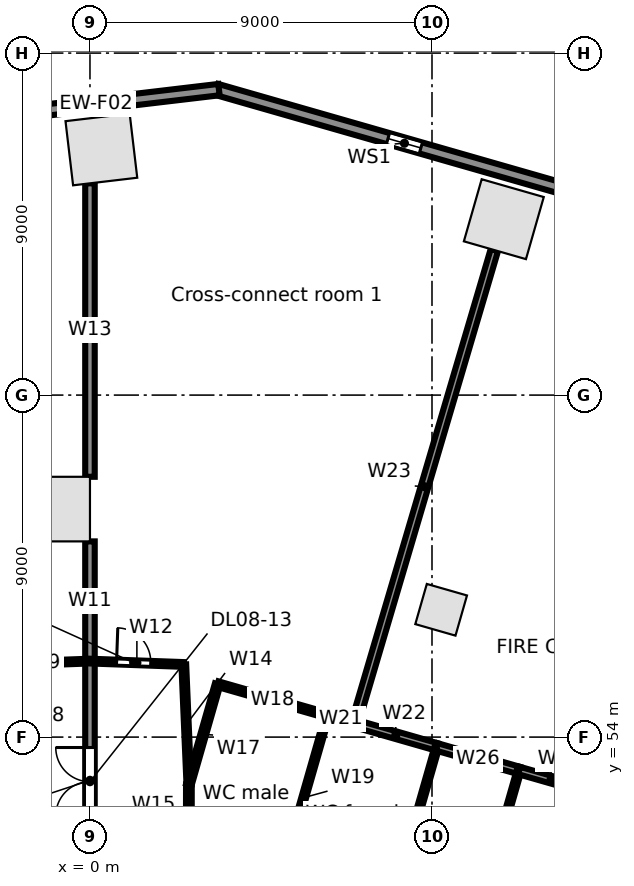
"""IFC4 building model, lengths in metres.
Left out: names, types, materials, properties, quantities, classifications, styles, units other than length and angle.
Written with IfcOpenShell. Run it as: python <this file> out.ifc"""

import sys

from ifc_helpers import new_model, si_unit, direction, frame, frame_2d, origin, origin_2d, place, context, subcontext, project, spatial, rectangle, extrude, element, fill, save


model = new_model("IFC4")
c1 = context("Model", 3, precision=1e-05, world=origin(), true_north=direction((0.0, 1.0)))
c2 = subcontext(c1, "Body", "Model", "MODEL_VIEW")
j1 = project(units=[si_unit("LENGTHUNIT", "METRE"), si_unit("PLANEANGLEUNIT", "RADIAN")], contexts=[c1])
p1 = place(None, origin())
s1 = spatial("IfcSite", under=j1, at=p1, CompositionType="ELEMENT")
p2 = place(p1, origin())
s2 = spatial("IfcBuilding", under=s1, at=p2, CompositionType="ELEMENT")
p3 = place(p2, frame((0.0, 0.0, 51.5)))
s3 = spatial("IfcBuildingStorey", under=s2, at=p3, CompositionType="ELEMENT", Elevation=51.5)
for number, where, z_axis, x_axis in (
    (1, (10.89, 67.629, 0.0), (0.0, 0.0, 1.0), (-0.961, 0.276, 0.0)),
    (2, (0.3, 69.464, 0.0), (0.0, 0.0, 1.0), (-0.993, -0.118, 0.0)),
    (3, (-0.85, 60.0, 0.0), (0.0, 0.0, 1.0), (0.0, 1.0, 0.0)),
):
    element("IfcColumn", number, at=place(p3, frame(where, z_axis=z_axis, x_axis=x_axis)), inside=s3, PredefinedType="COLUMN", context=c2, shape_type="SweptSolid", body=[
        extrude(rectangle(XDim=1.7, YDim=1.7, at=origin_2d()), origin(), (0.0, 0.0, 1.0), 5.0),
    ])
p4 = place(p3, frame((9.241, 57.35, 0.0), z_axis=(0.0, 0.0, 1.0), x_axis=(0.961261695938, -0.275637355817, 0.0)))
e4 = element("IfcColumn", 4, at=p4, inside=s3, PredefinedType="COLUMN", context=c2, shape_type="SweptSolid", body=[
    extrude(rectangle(XDim=1.1, YDim=1.1, at=origin_2d()), origin(), (0.0, 0.0, 1.0), 5.0),
])
p5 = place(p3, frame((3.335, 71.044, 0.0), z_axis=(0.0, 0.0, 1.0), x_axis=(0.961260130989, -0.275642813387, 0.0)))
e5 = element("IfcWall", 5, at=p5, inside=s3, PredefinedType="STANDARD", context=c2, shape_type="SweptSolid", body=[
    extrude(rectangle(XDim=32.741, YDim=0.3, at=frame_2d((16.371, 0.0))), origin(), (0.0, 0.0, 1.0), 4.68),
])
p6 = place(p5, frame((29.207, 0.0, 0.6)))
e6 = element("IfcOpeningElement", 6, at=p6, cuts=e5, PredefinedType="OPENING", context=c2, shape_type="SweptSolid", body=[
    extrude(rectangle(XDim=0.9, YDim=3.2, at=frame_2d((0.45, 1.6))), frame((0.0, 0.16, 0.0), z_axis=(0.0, -1.0, 0.0), x_axis=(1.0, 0.0, 0.0)), (0.0, 0.0, 1.0), 0.32),
])
p7 = place(p5, frame((21.034, 0.0, 0.6)))
e7 = element("IfcOpeningElement", 7, at=p7, cuts=e5, PredefinedType="OPENING", context=c2, shape_type="SweptSolid", body=[
    extrude(rectangle(XDim=0.9, YDim=3.2, at=frame_2d((0.45, 1.6))), frame((0.0, 0.16, 0.0), z_axis=(0.0, -1.0, 0.0), x_axis=(1.0, 0.0, 0.0)), (0.0, 0.0, 1.0), 0.32),
])
p8 = place(p5, frame((12.861, 0.0, 0.6)))
e8 = element("IfcOpeningElement", 8, at=p8, cuts=e5, PredefinedType="OPENING", context=c2, shape_type="SweptSolid", body=[
    extrude(rectangle(XDim=0.9, YDim=3.2, at=frame_2d((0.45, 1.6))), frame((0.0, 0.16, 0.0), z_axis=(0.0, -1.0, 0.0), x_axis=(1.0, 0.0, 0.0)), (0.0, 0.0, 1.0), 0.32),
])
p9 = place(p5, frame((4.688, 0.0, 0.6)))
e9 = element("IfcOpeningElement", 9, at=p9, cuts=e5, PredefinedType="OPENING", context=c2, shape_type="SweptSolid", body=[
    extrude(rectangle(XDim=0.9, YDim=3.2, at=frame_2d((0.45, 1.6))), frame((0.0, 0.16, 0.0), z_axis=(0.0, -1.0, 0.0), x_axis=(1.0, 0.0, 0.0)), (0.0, 0.0, 1.0), 0.32),
])
p10 = place(p3, frame((-3.076, 70.273, 0.0), z_axis=(0.0, 0.0, 1.0), x_axis=(0.993067743007, 0.117543429416, 0.0)))
e10 = element("IfcWall", 10, at=p10, inside=s3, PredefinedType="STANDARD", context=c2, shape_type="SweptSolid", body=[
    extrude(rectangle(XDim=6.516, YDim=0.3, at=frame_2d((3.258, 0.0))), origin(), (0.0, 0.0, 1.0), 4.68),
])
p11 = place(p3, frame((-2.67, 55.904, 0.0), z_axis=(0.0, 0.0, 1.0), x_axis=(0.999354913865, 0.03591317494, 0.0)))
e11 = element("IfcWall", 11, at=p11, inside=s3, PredefinedType="PARTITIONING", context=c2, shape_type="SweptSolid", body=[
    extrude(rectangle(XDim=2.672, YDim=0.125, at=frame_2d((1.336, 0.0))), origin(), (0.0, 0.0, 1.0), 3.742),
])
p12 = place(p3, frame((0.0, 49.726, 0.0), z_axis=(0.0, 0.0, 1.0), x_axis=(0.0, 1.0, 0.0)))
e12 = element("IfcWall", 12, at=p12, inside=s3, PredefinedType="PARTITIONING", context=c2, shape_type="SweptSolid", body=[
    extrude(rectangle(XDim=6.274, YDim=0.25, at=frame_2d((3.137, 0.0))), origin(), (0.0, 0.0, 1.0), 4.68),
])
p13 = place(p12, frame((2.2, 0.0, 0.0)))
e13 = element("IfcOpeningElement", 13, at=p13, cuts=e12, PredefinedType="OPENING", context=c2, shape_type="SweptSolid", body=[
    extrude(rectangle(XDim=1.8, YDim=2.1, at=frame_2d((0.9, 1.05))), frame((0.0, 0.135, 0.0), z_axis=(0.0, -1.0, 0.0), x_axis=(1.0, 0.0, 0.0)), (0.0, 0.0, 1.0), 0.27),
])
p14 = place(p3, frame((0.0, 56.0, 0.0), z_axis=(0.0, 0.0, 1.0), x_axis=(0.0, 1.0, 0.0)))
e14 = element("IfcWall", 14, at=p14, inside=s3, PredefinedType="PARTITIONING", context=c2, shape_type="SweptSolid", body=[
    extrude(rectangle(XDim=3.15, YDim=0.25, at=frame_2d((1.575, 0.0))), origin(), (0.0, 0.0, 1.0), 4.68),
])
p15 = place(p3, frame((0.0, 56.0, 0.0), z_axis=(0.0, 0.0, 1.0), x_axis=(0.999349313684, -0.036068673934, 0.0)))
e15 = element("IfcWall", 15, at=p15, inside=s3, PredefinedType="PARTITIONING", context=c2, shape_type="SweptSolid", body=[
    extrude(rectangle(XDim=2.471, YDim=0.125, at=frame_2d((1.235, 0.0))), origin(), (0.0, 0.0, 1.0), 4.68),
])
p16 = place(p15, frame((0.7, 0.0, 0.0)))
e16 = element("IfcOpeningElement", 16, at=p16, cuts=e15, PredefinedType="OPENING", context=c2, shape_type="SweptSolid", body=[
    extrude(rectangle(XDim=0.9, YDim=2.1, at=frame_2d((0.45, 1.05))), frame((0.0, 0.073, 0.0), z_axis=(0.0, -1.0, 0.0), x_axis=(1.0, 0.0, 0.0)), (0.0, 0.0, 1.0), 0.145),
])
p17 = place(p3, frame((0.0, 60.85, 0.0), z_axis=(0.0, 0.0, 1.0), x_axis=(0.0, 1.0, 0.0)))
e17 = element("IfcWall", 17, at=p17, inside=s3, PredefinedType="PARTITIONING", context=c2, shape_type="SweptSolid", body=[
    extrude(rectangle(XDim=7.723, YDim=0.25, at=frame_2d((3.861, 0.0))), origin(), (0.0, 0.0, 1.0), 3.952),
])
p18 = place(p3, frame((2.469, 55.911, 0.0), z_axis=(0.0, 0.0, 1.0), x_axis=(0.042391721597, -0.99910106693, 0.0)))
e18 = element("IfcWall", 18, at=p18, inside=s3, PredefinedType="PARTITIONING", context=c2, shape_type="SweptSolid", body=[
    extrude(rectangle(XDim=3.162, YDim=0.125, at=frame_2d((1.581, 0.0))), origin(), (0.0, 0.0, 1.0), 4.68),
])
p19 = place(p3, frame((2.601, 50.932, 0.0), z_axis=(0.0, 0.0, 1.0), x_axis=(0.001073104681, 0.999999424223, 0.0)))
e19 = element("IfcWall", 19, at=p19, inside=s3, PredefinedType="PARTITIONING", context=c2, shape_type="SweptSolid", body=[
    extrude(rectangle(XDim=1.82, YDim=0.15, at=frame_2d((0.91, 0.0))), origin(), (0.0, 0.0, 1.0), 4.68),
])
p20 = place(p3, frame((2.603, 52.752, 0.0), z_axis=(0.0, 0.0, 1.0), x_axis=(0.27569433145, 0.961245356611, 0.0)))
e20 = element("IfcWall", 20, at=p20, inside=s3, PredefinedType="PARTITIONING", context=c2, shape_type="SweptSolid", body=[
    extrude(rectangle(XDim=2.75, YDim=0.15, at=frame_2d((1.375, 0.0))), origin(), (0.0, 0.0, 1.0), 4.68),
])
p21 = place(p3, frame((3.361, 55.395, 0.0), z_axis=(0.0, 0.0, 1.0), x_axis=(0.961268664977, -0.27561305073, 0.0)))
e21 = element("IfcWall", 21, at=p21, inside=s3, PredefinedType="PARTITIONING", context=c2, shape_type="SweptSolid", body=[
    extrude(rectangle(XDim=3.0, YDim=0.15, at=frame_2d((1.5, 0.0))), origin(), (0.0, 0.0, 1.0), 4.68),
])
p22 = place(p3, frame((5.004, 50.243, 0.0), z_axis=(0.0, 0.0, 1.0), x_axis=(0.275838825927, 0.961203902464, 0.0)))
e22 = element("IfcWall", 22, at=p22, inside=s3, PredefinedType="PARTITIONING", context=c2, shape_type="SweptSolid", body=[
    extrude(rectangle(XDim=4.5, YDim=0.125, at=frame_2d((2.25, 0.0))), origin(), (0.0, 0.0, 1.0), 4.68),
])
p23 = place(p3, frame((6.245, 54.568, 0.0), z_axis=(0.0, 0.0, 1.0), x_axis=(0.961499370144, -0.274807134575, 0.0)))
e23 = element("IfcWall", 23, at=p23, inside=s3, PredefinedType="PARTITIONING", context=c2, shape_type="SweptSolid", body=[
    extrude(rectangle(XDim=0.75, YDim=0.15, at=frame_2d((0.375, 0.0))), origin(), (0.0, 0.0, 1.0), 4.68),
])
p24 = place(p3, frame((6.966, 54.362, 0.0), z_axis=(0.0, 0.0, 1.0), x_axis=(0.961154610169, -0.276010534854, 0.0)))
e24 = element("IfcWall", 24, at=p24, inside=s3, PredefinedType="PARTITIONING", context=c2, shape_type="SweptSolid", body=[
    extrude(rectangle(XDim=2.25, YDim=0.2, at=frame_2d((1.125, 0.0))), origin(), (0.0, 0.0, 1.0), 3.852),
])
p25 = place(p3, frame((6.966, 54.362, 0.0), z_axis=(0.0, 0.0, 1.0), x_axis=(0.283027392509, 0.959111826165, 0.0)))
e25 = element("IfcWall", 25, at=p25, inside=s3, PredefinedType="PARTITIONING", context=c2, shape_type="SweptSolid", body=[
    extrude(rectangle(XDim=12.985, YDim=0.2, at=frame_2d((6.492, 0.0))), origin(), (0.0, 0.0, 1.0), 3.742),
])
p26 = place(p3, frame((7.888, 49.416, 0.0), z_axis=(0.0, 0.0, 1.0), x_axis=(0.275803080638, 0.96121415965, 0.0)))
e26 = element("IfcWall", 26, at=p26, inside=s3, PredefinedType="PARTITIONING", context=c2, shape_type="SweptSolid", body=[
    extrude(rectangle(XDim=4.5, YDim=0.125, at=frame_2d((2.25, 0.0))), origin(), (0.0, 0.0, 1.0), 3.852),
])
p27 = place(p3, frame((9.129, 53.741, 0.0), z_axis=(0.0, 0.0, 1.0), x_axis=(0.961273691875, -0.275595517578, 0.0)))
e27 = element("IfcWall", 27, at=p27, inside=s3, PredefinedType="PARTITIONING", context=c2, shape_type="SweptSolid", body=[
    extrude(rectangle(XDim=2.249, YDim=0.2, at=frame_2d((1.125, 0.0))), origin(), (0.0, 0.0, 1.0), 3.742),
])
p28 = place(p3, frame((10.051, 48.795, 0.0), z_axis=(0.0, 0.0, 1.0), x_axis=(0.275530671241, 0.961292280841, 0.0)))
e28 = element("IfcWall", 28, at=p28, inside=s3, PredefinedType="PARTITIONING", context=c2, shape_type="SweptSolid", body=[
    extrude(rectangle(XDim=4.5, YDim=0.125, at=frame_2d((2.25, 0.0))), origin(), (0.0, 0.0, 1.0), 4.68),
])
p29 = place(p3, frame((11.291, 53.121, 0.0), z_axis=(0.0, 0.0, 1.0), x_axis=(0.961329010357, -0.275402494264, 0.0)))
e29 = element("IfcWall", 29, at=p29, inside=s3, PredefinedType="PARTITIONING", context=c2, shape_type="SweptSolid", body=[
    extrude(rectangle(XDim=1.751, YDim=0.2, at=frame_2d((0.875, 0.0))), origin(), (0.0, 0.0, 1.0), 4.68),
])
p30 = place(p3, frame((11.733, 48.313, 0.0), z_axis=(0.0, 0.0, 1.0), x_axis=(0.275795676316, 0.961216284155, 0.0)))
e30 = element("IfcWall", 30, at=p30, inside=s3, PredefinedType="PARTITIONING", context=c2, shape_type="SweptSolid", body=[
    extrude(rectangle(XDim=4.5, YDim=0.2, at=frame_2d((2.25, 0.0))), origin(), (0.0, 0.0, 1.0), 4.68),
])
p31 = place(p9, origin())
e31 = element("IfcWindow", 31, at=p31, inside=s3, PartitioningType="SINGLE_PANEL", PredefinedType="WINDOW", context=c2, shape_type="SweptSolid", body=[
    extrude(rectangle(XDim=0.9, YDim=3.2, at=frame_2d((0.45, 1.6))), frame((0.0, 0.03, 0.0), z_axis=(0.0, -1.0, 0.0), x_axis=(1.0, 0.0, 0.0)), (0.0, 0.0, 1.0), 0.06),
])
fill(e9, e31)
p32 = place(p16, origin())
e32 = element("IfcDoor", 32, at=p32, inside=s3, OperationType="SINGLE_SWING_LEFT", PredefinedType="DOOR", context=c2, shape_type="SweptSolid", body=[
    extrude(rectangle(XDim=0.9, YDim=2.1, at=frame_2d((0.45, 1.05))), frame((0.0, 0.025, 0.0), z_axis=(0.0, -1.0, 0.0), x_axis=(1.0, 0.0, 0.0)), (0.0, 0.0, 1.0), 0.05),
])
fill(e16, e32)
p33 = place(p13, origin())
e33 = element("IfcDoor", 33, at=p33, inside=s3, OperationType="DOUBLE_DOOR_SINGLE_SWING", PredefinedType="DOOR", context=c2, shape_type="SweptSolid", body=[
    extrude(rectangle(XDim=1.8, YDim=2.1, at=frame_2d((0.9, 1.05))), frame((0.0, 0.025, 0.0), z_axis=(0.0, -1.0, 0.0), x_axis=(1.0, 0.0, 0.0)), (0.0, 0.0, 1.0), 0.05),
])
fill(e13, e33)
save(model, sys.argv[1])
